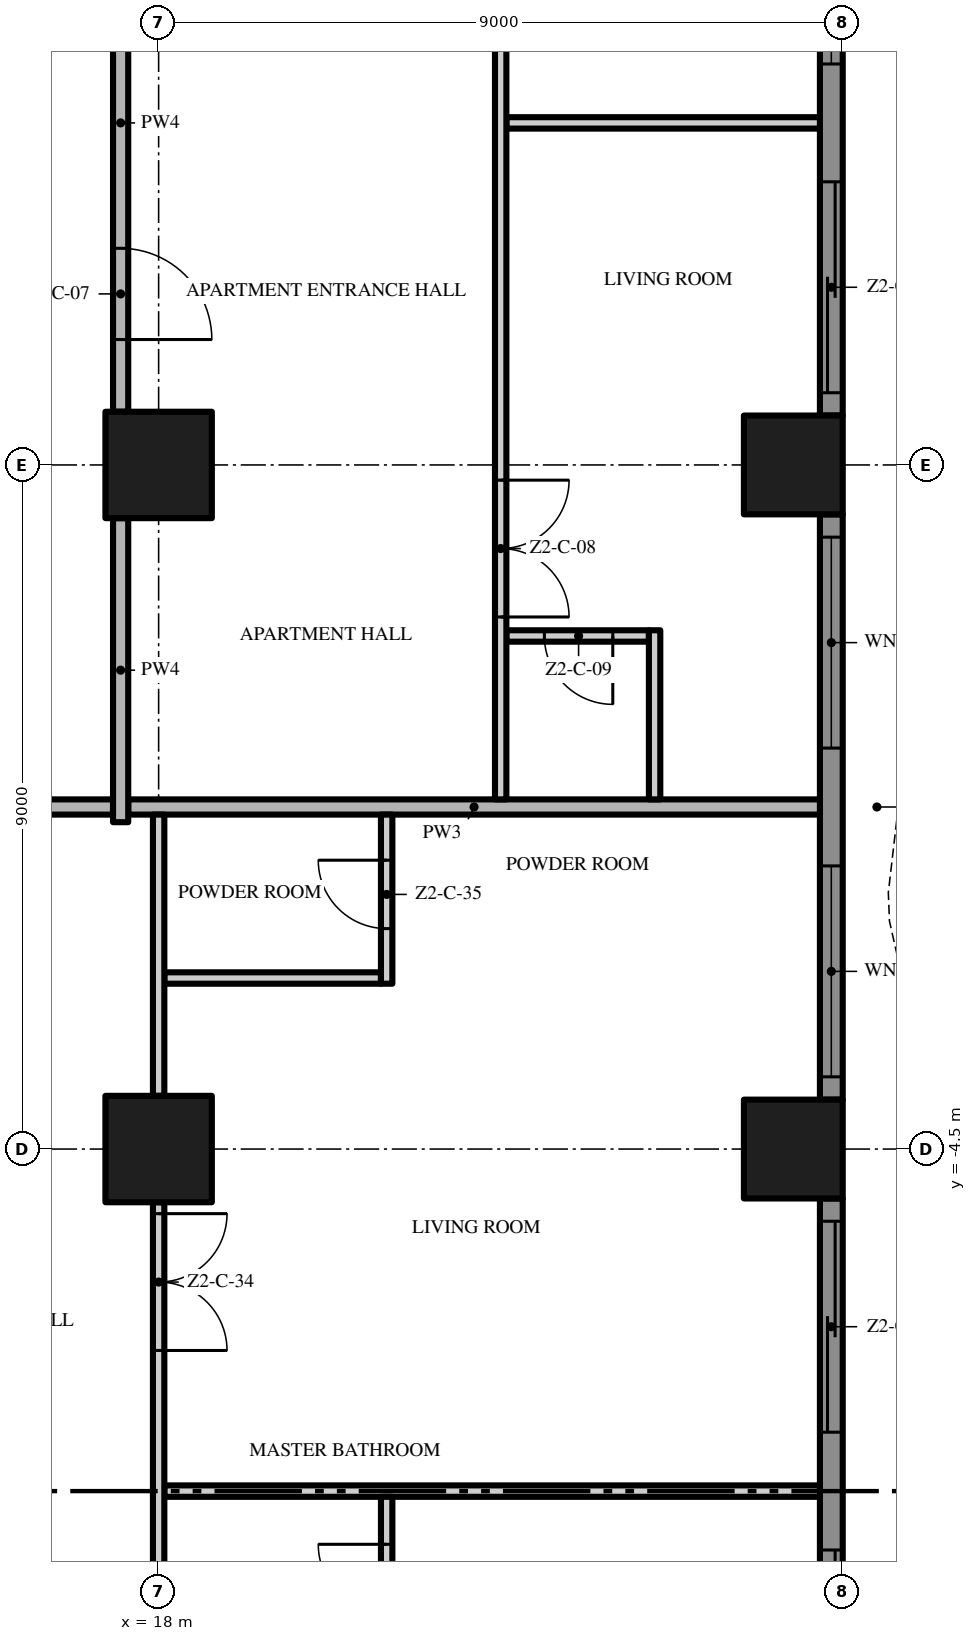
"""IFC4 building model, lengths in metres.
Left out: names, types, materials, properties, quantities, classifications, styles, units other than length and angle.
Written with IfcOpenShell. Run it as: python <this file> out.ifc"""

import sys

from ifc_helpers import new_model, si_unit, direction, frame, frame_2d, origin, origin_2d, place, context, subcontext, project, spatial, polyline, rectangle, outline, extrude, element, fill, save


model = new_model("IFC4")
c1 = context("Model", 3, precision=1e-05, world=origin(), true_north=direction((0.0, 1.0)))
c2 = subcontext(c1, "Body", "Model", "MODEL_VIEW")
j1 = project(units=[si_unit("LENGTHUNIT", "METRE"), si_unit("PLANEANGLEUNIT", "RADIAN")], contexts=[c1])
p1 = place(None, origin())
s1 = spatial("IfcSite", under=j1, at=p1, CompositionType="ELEMENT")
p2 = place(p1, origin())
s2 = spatial("IfcBuilding", under=s1, at=p2, CompositionType="ELEMENT")
p3 = place(p2, frame((0.0, 0.0, 96.0)))
s3 = spatial("IfcBuildingStorey", under=s2, at=p3, CompositionType="ELEMENT", Elevation=96.0)
for number, where, z_axis, x_axis in (
    (1, (18.0, -4.5, 0.0), (0.0, 0.0, 1.0), (1.0, 0.0, 0.0)),
    (2, (18.0, 4.5, 0.0), (0.0, 0.0, 1.0), (1.0, 0.0, 0.0)),
):
    element("IfcColumn", number, at=place(p3, frame(where, z_axis=z_axis, x_axis=x_axis)), inside=s3, PredefinedType="COLUMN", context=c2, shape_type="SweptSolid", body=[
        extrude(rectangle(XDim=1.4, YDim=1.4, at=origin_2d()), origin(), (0.0, 0.0, 1.0), 3.5),
    ])
for number, where, z_axis, x_axis in (
    (3, (26.35, -4.5, 0.0), (0.0, 0.0, 1.0), (1.0, 0.0, 0.0)),
    (4, (26.35, 4.5, 0.0), (0.0, 0.0, 1.0), (1.0, 0.0, 0.0)),
):
    element("IfcColumn", number, at=place(p3, frame(where, z_axis=z_axis, x_axis=x_axis)), inside=s3, PredefinedType="COLUMN", context=c2, shape_type="SweptSolid", body=[
        extrude(rectangle(XDim=1.3, YDim=1.3, at=origin_2d()), origin(), (0.0, 0.0, 1.0), 3.5),
    ])
p4 = place(p3, frame((26.85, -5.15, 0.0), z_axis=(0.0, 0.0, 1.0), x_axis=(0.0, -1.0, 0.0)))
e5 = element("IfcWall", 5, at=p4, inside=s3, PredefinedType="SOLIDWALL", context=c2, shape_type="SweptSolid", body=[
    extrude(rectangle(XDim=7.7, YDim=0.3, at=frame_2d((3.85, 0.0))), origin(), (0.0, 0.0, 1.0), 3.5),
])
p5 = place(p4, frame((4.625, 0.0, 0.0)))
e6 = element("IfcOpeningElement", 6, at=p5, cuts=e5, PredefinedType="OPENING", context=c2, shape_type="SweptSolid", body=[
    extrude(rectangle(XDim=2.775, YDim=2.4, at=frame_2d((1.387, 1.2))), frame((0.0, 0.16, 0.0), z_axis=(0.0, -1.0, 0.0), x_axis=(1.0, 0.0, 0.0)), (0.0, 0.0, 1.0), 0.32),
])
p6 = place(p4, frame((0.3, 0.0, 0.0)))
e7 = element("IfcOpeningElement", 7, at=p6, cuts=e5, PredefinedType="OPENING", context=c2, shape_type="SweptSolid", body=[
    extrude(rectangle(XDim=2.775, YDim=2.4, at=frame_2d((1.387, 1.2))), frame((0.0, 0.16, 0.0), z_axis=(0.0, -1.0, 0.0), x_axis=(1.0, 0.0, 0.0)), (0.0, 0.0, 1.0), 0.32),
])
p7 = place(p3, frame((26.85, 3.85, 0.0), z_axis=(0.0, 0.0, 1.0), x_axis=(0.0, -1.0, 0.0)))
e8 = element("IfcWall", 8, at=p7, inside=s3, PredefinedType="SOLIDWALL", context=c2, shape_type="SweptSolid", body=[
    extrude(rectangle(XDim=7.7, YDim=0.3, at=frame_2d((3.85, 0.0))), origin(), (0.0, 0.0, 1.0), 3.5),
])
p8 = place(p7, frame((4.625, 0.0, 0.45)))
e9 = element("IfcOpeningElement", 9, at=p8, cuts=e8, PredefinedType="OPENING", context=c2, shape_type="SweptSolid", body=[
    extrude(rectangle(XDim=2.775, YDim=2.65, at=frame_2d((1.387, 1.325))), frame((0.0, 0.16, 0.0), z_axis=(0.0, -1.0, 0.0), x_axis=(1.0, 0.0, 0.0)), (0.0, 0.0, 1.0), 0.32),
])
p9 = place(p7, frame((0.3, 0.0, 0.45)))
e10 = element("IfcOpeningElement", 10, at=p9, cuts=e8, PredefinedType="OPENING", context=c2, shape_type="SweptSolid", body=[
    extrude(rectangle(XDim=2.775, YDim=2.65, at=frame_2d((1.387, 1.325))), frame((0.0, 0.16, 0.0), z_axis=(0.0, -1.0, 0.0), x_axis=(1.0, 0.0, 0.0)), (0.0, 0.0, 1.0), 0.32),
])
p10 = place(p3, frame((26.85, 12.85, 0.0), z_axis=(0.0, 0.0, 1.0), x_axis=(0.0, -1.0, 0.0)))
e11 = element("IfcWall", 11, at=p10, inside=s3, PredefinedType="SOLIDWALL", context=c2, shape_type="SweptSolid", body=[
    extrude(rectangle(XDim=7.7, YDim=0.3, at=frame_2d((3.85, 0.0))), origin(), (0.0, 0.0, 1.0), 3.5),
])
p11 = place(p10, frame((4.625, 0.0, 0.0)))
e12 = element("IfcOpeningElement", 12, at=p11, cuts=e11, PredefinedType="OPENING", context=c2, shape_type="SweptSolid", body=[
    extrude(rectangle(XDim=2.775, YDim=2.4, at=frame_2d((1.387, 1.2))), frame((0.0, 0.16, 0.0), z_axis=(0.0, -1.0, 0.0), x_axis=(1.0, 0.0, 0.0)), (0.0, 0.0, 1.0), 0.32),
])
p12 = place(p10, frame((0.3, 0.0, 0.45)))
e13 = element("IfcOpeningElement", 13, at=p12, cuts=e11, PredefinedType="OPENING", context=c2, shape_type="SweptSolid", body=[
    extrude(rectangle(XDim=2.775, YDim=2.65, at=frame_2d((1.387, 1.325))), frame((0.0, 0.16, 0.0), z_axis=(0.0, -1.0, 0.0), x_axis=(1.0, 0.0, 0.0)), (0.0, 0.0, 1.0), 0.32),
])
p13 = place(p3, origin())
e14 = element("IfcWall", 14, at=p13, inside=s3, PredefinedType="USERDEFINED", context=c2, shape_type="SweptSolid", body=[
    extrude(outline(polyline([(27.951, -18.0), (27.615, -16.5), (27.6, -16.125), (27.731, -15.0), (28.255, -13.5), (28.988, -12.0), (29.649, -10.5), (29.985, -9.0), (30.0, -8.625), (29.869, -7.5), (29.345, -6.0), (28.612, -4.5), (27.951, -3.0), (27.615, -1.5), (27.6, -1.125), (27.731, 0.0), (28.255, 1.5), (28.988, 3.0), (29.649, 4.5), (29.985, 6.0), (30.0, 6.375), (29.869, 7.5), (29.345, 9.0), (28.612, 10.5), (27.951, 12.0), (27.615, 13.5), (27.6, 13.875), (27.731, 15.0), (28.255, 16.5), (28.988, 18.0), (28.763, 18.11), (28.024, 16.596), (27.486, 15.056), (27.349, 13.885), (27.366, 13.467), (27.713, 11.921), (28.385, 10.395), (29.114, 8.904), (29.624, 7.444), (29.749, 6.365), (29.736, 6.033), (29.41, 4.579), (28.761, 3.105), (28.024, 1.596), (27.486, 0.056), (27.349, -1.115), (27.366, -1.533), (27.713, -3.079), (28.385, -4.605), (29.114, -6.096), (29.624, -7.556), (29.749, -8.635), (29.736, -8.967), (29.41, -10.421), (28.761, -11.895), (28.024, -13.404), (27.486, -14.944), (27.349, -16.115), (27.366, -16.533), (27.708, -18.055), (27.951, -18.0)])), origin(), (0.0, 0.0, 1.0), 0.9),
])
p14 = place(p3, frame((18.075, -9.0, 0.0), z_axis=(0.0, 0.0, 1.0), x_axis=(1.0, 0.0, 0.0)))
e15 = element("IfcWall", 15, at=p14, inside=s3, PredefinedType="PARTITIONING", context=c2, shape_type="SweptSolid", body=[
    extrude(rectangle(XDim=8.625, YDim=0.15, at=frame_2d((4.312, 0.0))), origin(), (0.0, 0.0, 1.0), 3.5),
])
p15 = place(p3, frame((18.075, -2.25, 0.0), z_axis=(0.0, 0.0, 1.0), x_axis=(1.0, 0.0, 0.0)))
e16 = element("IfcWall", 16, at=p15, inside=s3, PredefinedType="PARTITIONING", context=c2, shape_type="SweptSolid", body=[
    extrude(rectangle(XDim=2.85, YDim=0.15, at=frame_2d((1.425, 0.0))), origin(), (0.0, 0.0, 1.0), 3.5),
])
p16 = place(p3, frame((4.6, 0.0, 0.0), z_axis=(0.0, 0.0, 1.0), x_axis=(1.0, 0.0, 0.0)))
e17 = element("IfcWall", 17, at=p16, inside=s3, PredefinedType="PARTITIONING", context=c2, shape_type="SweptSolid", body=[
    extrude(rectangle(XDim=12.8, YDim=0.2, at=frame_2d((6.4, 0.0))), origin(), (0.0, 0.0, 1.0), 3.5),
])
p17 = place(p3, frame((17.6, 0.0, 0.0), z_axis=(0.0, 0.0, 1.0), x_axis=(1.0, 0.0, 0.0)))
e18 = element("IfcWall", 18, at=p17, inside=s3, PredefinedType="PARTITIONING", context=c2, shape_type="SweptSolid", body=[
    extrude(rectangle(XDim=9.1, YDim=0.2, at=frame_2d((4.55, 0.0))), origin(), (0.0, 0.0, 1.0), 3.5),
])
p18 = place(p3, frame((24.45, 2.25, 0.0), z_axis=(0.0, 0.0, 1.0), x_axis=(-1.0, 0.0, 0.0)))
e19 = element("IfcWall", 19, at=p18, inside=s3, PredefinedType="PARTITIONING", context=c2, shape_type="SweptSolid", body=[
    extrude(rectangle(XDim=1.875, YDim=0.15, at=frame_2d((0.938, 0.0))), origin(), (0.0, 0.0, 1.0), 3.5),
])
p19 = place(p18, frame((0.475, 0.0, 0.0)))
e20 = element("IfcOpeningElement", 20, at=p19, cuts=e19, PredefinedType="OPENING", context=c2, shape_type="SweptSolid", body=[
    extrude(rectangle(XDim=0.9, YDim=2.1, at=frame_2d((0.45, 1.05))), frame((0.0, 0.085, 0.0), z_axis=(0.0, -1.0, 0.0), x_axis=(1.0, 0.0, 0.0)), (0.0, 0.0, 1.0), 0.17),
])
p20 = place(p3, frame((22.575, 9.0, 0.0), z_axis=(0.0, 0.0, 1.0), x_axis=(1.0, 0.0, 0.0)))
e21 = element("IfcWall", 21, at=p20, inside=s3, PredefinedType="PARTITIONING", context=c2, shape_type="SweptSolid", body=[
    extrude(rectangle(XDim=4.125, YDim=0.15, at=frame_2d((2.062, 0.0))), origin(), (0.0, 0.0, 1.0), 3.5),
])
p21 = place(p3, frame((17.5, -0.2, 0.0), z_axis=(0.0, 0.0, 1.0), x_axis=(0.0, 1.0, 0.0)))
e22 = element("IfcWall", 22, at=p21, inside=s3, PredefinedType="PARTITIONING", context=c2, shape_type="SweptSolid", body=[
    extrude(rectangle(XDim=4.0, YDim=0.2, at=frame_2d((2.0, 0.0))), origin(), (0.0, 0.0, 1.0), 3.5),
])
p22 = place(p3, frame((17.5, 12.8, 0.0), z_axis=(0.0, 0.0, 1.0), x_axis=(0.0, -1.0, 0.0)))
e23 = element("IfcWall", 23, at=p22, inside=s3, PredefinedType="PARTITIONING", context=c2, shape_type="SweptSolid", body=[
    extrude(rectangle(XDim=7.6, YDim=0.2, at=frame_2d((3.8, 0.0))), origin(), (0.0, 0.0, 1.0), 3.5),
])
p23 = place(p22, frame((5.45, 0.0, 0.0)))
e24 = element("IfcOpeningElement", 24, at=p23, cuts=e23, PredefinedType="OPENING", context=c2, shape_type="SweptSolid", body=[
    extrude(rectangle(XDim=1.2, YDim=2.4, at=frame_2d((0.6, 1.2))), frame((0.0, 0.11, 0.0), z_axis=(0.0, -1.0, 0.0), x_axis=(1.0, 0.0, 0.0)), (0.0, 0.0, 1.0), 0.22),
])
p24 = place(p3, frame((18.0, -5.2, 0.0), z_axis=(0.0, 0.0, 1.0), x_axis=(0.0, -1.0, 0.0)))
e25 = element("IfcWall", 25, at=p24, inside=s3, PredefinedType="PARTITIONING", context=c2, shape_type="SweptSolid", body=[
    extrude(rectangle(XDim=7.6, YDim=0.15, at=frame_2d((3.8, 0.0))), origin(), (0.0, 0.0, 1.0), 3.5),
])
p25 = place(p24, frame((0.15, 0.0, 0.0)))
e26 = element("IfcOpeningElement", 26, at=p25, cuts=e25, PredefinedType="OPENING", context=c2, shape_type="SweptSolid", body=[
    extrude(rectangle(XDim=1.8, YDim=2.4, at=frame_2d((0.9, 1.2))), frame((0.0, 0.085, 0.0), z_axis=(0.0, -1.0, 0.0), x_axis=(1.0, 0.0, 0.0)), (0.0, 0.0, 1.0), 0.17),
])
p26 = place(p24, frame((6.45, 0.0, 0.0)))
e27 = element("IfcOpeningElement", 27, at=p26, cuts=e25, PredefinedType="OPENING", context=c2, shape_type="SweptSolid", body=[
    extrude(rectangle(XDim=1.0, YDim=2.4, at=frame_2d((0.5, 1.2))), frame((0.0, 0.085, 0.0), z_axis=(0.0, -1.0, 0.0), x_axis=(1.0, 0.0, 0.0)), (0.0, 0.0, 1.0), 0.17),
])
p27 = place(p3, frame((18.0, -3.8, 0.0), z_axis=(0.0, 0.0, 1.0), x_axis=(0.0, 1.0, 0.0)))
e28 = element("IfcWall", 28, at=p27, inside=s3, PredefinedType="PARTITIONING", context=c2, shape_type="SweptSolid", body=[
    extrude(rectangle(XDim=3.7, YDim=0.15, at=frame_2d((1.85, 0.0))), origin(), (0.0, 0.0, 1.0), 3.5),
])
p28 = place(p3, frame((21.0, -11.325, 0.0), z_axis=(0.0, 0.0, 1.0), x_axis=(0.0, 1.0, 0.0)))
e29 = element("IfcWall", 29, at=p28, inside=s3, PredefinedType="PARTITIONING", context=c2, shape_type="SweptSolid", body=[
    extrude(rectangle(XDim=2.25, YDim=0.15, at=frame_2d((1.125, 0.0))), origin(), (0.0, 0.0, 1.0), 3.5),
])
p29 = place(p28, frame((0.725, 0.0, 0.0)))
e30 = element("IfcOpeningElement", 30, at=p29, cuts=e29, PredefinedType="OPENING", context=c2, shape_type="SweptSolid", body=[
    extrude(rectangle(XDim=0.9, YDim=2.1, at=frame_2d((0.45, 1.05))), frame((0.0, 0.085, 0.0), z_axis=(0.0, -1.0, 0.0), x_axis=(1.0, 0.0, 0.0)), (0.0, 0.0, 1.0), 0.17),
])
p30 = place(p3, frame((21.0, -2.325, 0.0), z_axis=(0.0, 0.0, 1.0), x_axis=(0.0, 1.0, 0.0)))
e31 = element("IfcWall", 31, at=p30, inside=s3, PredefinedType="PARTITIONING", context=c2, shape_type="SweptSolid", body=[
    extrude(rectangle(XDim=2.225, YDim=0.15, at=frame_2d((1.113, 0.0))), origin(), (0.0, 0.0, 1.0), 3.5),
])
p31 = place(p30, frame((0.725, 0.0, 0.0)))
e32 = element("IfcOpeningElement", 32, at=p31, cuts=e31, PredefinedType="OPENING", context=c2, shape_type="SweptSolid", body=[
    extrude(rectangle(XDim=0.9, YDim=2.1, at=frame_2d((0.45, 1.05))), frame((0.0, 0.085, 0.0), z_axis=(0.0, -1.0, 0.0), x_axis=(1.0, 0.0, 0.0)), (0.0, 0.0, 1.0), 0.17),
])
p32 = place(p3, frame((22.5, 17.35, 0.0), z_axis=(0.0, 0.0, 1.0), x_axis=(0.0, -1.0, 0.0)))
e33 = element("IfcWall", 33, at=p32, inside=s3, PredefinedType="PARTITIONING", context=c2, shape_type="SweptSolid", body=[
    extrude(rectangle(XDim=17.25, YDim=0.15, at=frame_2d((8.625, 0.0))), origin(), (0.0, 0.0, 1.0), 3.5),
])
p33 = place(p32, frame((13.05, 0.0, 0.0)))
e34 = element("IfcOpeningElement", 34, at=p33, cuts=e33, PredefinedType="OPENING", context=c2, shape_type="SweptSolid", body=[
    extrude(rectangle(XDim=1.8, YDim=2.4, at=frame_2d((0.9, 1.2))), frame((0.0, 0.085, 0.0), z_axis=(0.0, -1.0, 0.0), x_axis=(1.0, 0.0, 0.0)), (0.0, 0.0, 1.0), 0.17),
])
p34 = place(p32, frame((5.6, 0.0, 0.0)))
e35 = element("IfcOpeningElement", 35, at=p34, cuts=e33, PredefinedType="OPENING", context=c2, shape_type="SweptSolid", body=[
    extrude(rectangle(XDim=1.0, YDim=2.4, at=frame_2d((0.5, 1.2))), frame((0.0, 0.085, 0.0), z_axis=(0.0, -1.0, 0.0), x_axis=(1.0, 0.0, 0.0)), (0.0, 0.0, 1.0), 0.17),
])
p35 = place(p3, frame((24.525, 0.1, 0.0), z_axis=(0.0, 0.0, 1.0), x_axis=(0.0, 1.0, 0.0)))
e36 = element("IfcWall", 36, at=p35, inside=s3, PredefinedType="PARTITIONING", context=c2, shape_type="SweptSolid", body=[
    extrude(rectangle(XDim=2.225, YDim=0.15, at=frame_2d((1.113, 0.0))), origin(), (0.0, 0.0, 1.0), 3.5),
])
p36 = place(p5, origin())
e37 = element("IfcDoor", 37, at=p36, inside=s3, OperationType="SINGLE_SWING_LEFT", PredefinedType="DOOR", context=c2, shape_type="SweptSolid", body=[
    extrude(rectangle(XDim=2.775, YDim=2.4, at=frame_2d((1.387, 1.2))), frame((0.0, 0.025, 0.0), z_axis=(0.0, -1.0, 0.0), x_axis=(1.0, 0.0, 0.0)), (0.0, 0.0, 1.0), 0.05),
])
fill(e6, e37)
p37 = place(p6, origin())
e38 = element("IfcDoor", 38, at=p37, inside=s3, OperationType="SINGLE_SWING_LEFT", PredefinedType="DOOR", context=c2, shape_type="SweptSolid", body=[
    extrude(rectangle(XDim=2.775, YDim=2.4, at=frame_2d((1.387, 1.2))), frame((0.0, 0.025, 0.0), z_axis=(0.0, -1.0, 0.0), x_axis=(1.0, 0.0, 0.0)), (0.0, 0.0, 1.0), 0.05),
])
fill(e7, e38)
p38 = place(p8, origin())
e39 = element("IfcWindow", 39, at=p38, inside=s3, PartitioningType="SINGLE_PANEL", PredefinedType="WINDOW", context=c2, shape_type="SweptSolid", body=[
    extrude(rectangle(XDim=2.775, YDim=2.65, at=frame_2d((1.387, 1.325))), frame((0.0, 0.03, 0.0), z_axis=(0.0, -1.0, 0.0), x_axis=(1.0, 0.0, 0.0)), (0.0, 0.0, 1.0), 0.06),
])
fill(e9, e39)
p39 = place(p9, origin())
e40 = element("IfcWindow", 40, at=p39, inside=s3, PartitioningType="SINGLE_PANEL", PredefinedType="WINDOW", context=c2, shape_type="SweptSolid", body=[
    extrude(rectangle(XDim=2.775, YDim=2.65, at=frame_2d((1.387, 1.325))), frame((0.0, 0.03, 0.0), z_axis=(0.0, -1.0, 0.0), x_axis=(1.0, 0.0, 0.0)), (0.0, 0.0, 1.0), 0.06),
])
fill(e10, e40)
p40 = place(p11, origin())
e41 = element("IfcDoor", 41, at=p40, inside=s3, OperationType="SINGLE_SWING_LEFT", PredefinedType="DOOR", context=c2, shape_type="SweptSolid", body=[
    extrude(rectangle(XDim=2.775, YDim=2.4, at=frame_2d((1.387, 1.2))), frame((0.0, 0.025, 0.0), z_axis=(0.0, -1.0, 0.0), x_axis=(1.0, 0.0, 0.0)), (0.0, 0.0, 1.0), 0.05),
])
fill(e12, e41)
p41 = place(p12, origin())
e42 = element("IfcWindow", 42, at=p41, inside=s3, PartitioningType="SINGLE_PANEL", PredefinedType="WINDOW", context=c2, shape_type="SweptSolid", body=[
    extrude(rectangle(XDim=2.775, YDim=2.65, at=frame_2d((1.387, 1.325))), frame((0.0, 0.03, 0.0), z_axis=(0.0, -1.0, 0.0), x_axis=(1.0, 0.0, 0.0)), (0.0, 0.0, 1.0), 0.06),
])
fill(e13, e42)
p42 = place(p23, origin())
e43 = element("IfcDoor", 43, at=p42, inside=s3, OperationType="SINGLE_SWING_RIGHT", PredefinedType="DOOR", context=c2, shape_type="SweptSolid", body=[
    extrude(rectangle(XDim=1.2, YDim=2.4, at=frame_2d((0.6, 1.2))), frame((0.0, 0.025, 0.0), z_axis=(0.0, -1.0, 0.0), x_axis=(1.0, 0.0, 0.0)), (0.0, 0.0, 1.0), 0.05),
])
fill(e24, e43)
p43 = place(p33, origin())
e44 = element("IfcDoor", 44, at=p43, inside=s3, OperationType="DOUBLE_DOOR_SINGLE_SWING", PredefinedType="DOOR", context=c2, shape_type="SweptSolid", body=[
    extrude(rectangle(XDim=1.8, YDim=2.4, at=frame_2d((0.9, 1.2))), frame((0.0, 0.025, 0.0), z_axis=(0.0, -1.0, 0.0), x_axis=(1.0, 0.0, 0.0)), (0.0, 0.0, 1.0), 0.05),
])
fill(e34, e44)
p44 = place(p19, origin())
e45 = element("IfcDoor", 45, at=p44, inside=s3, OperationType="SINGLE_SWING_LEFT", PredefinedType="DOOR", context=c2, shape_type="SweptSolid", body=[
    extrude(rectangle(XDim=0.9, YDim=2.1, at=frame_2d((0.45, 1.05))), frame((0.0, 0.025, 0.0), z_axis=(0.0, -1.0, 0.0), x_axis=(1.0, 0.0, 0.0)), (0.0, 0.0, 1.0), 0.05),
])
fill(e20, e45)
p45 = place(p25, origin())
e46 = element("IfcDoor", 46, at=p45, inside=s3, OperationType="DOUBLE_DOOR_SINGLE_SWING", PredefinedType="DOOR", context=c2, shape_type="SweptSolid", body=[
    extrude(rectangle(XDim=1.8, YDim=2.4, at=frame_2d((0.9, 1.2))), frame((0.0, 0.025, 0.0), z_axis=(0.0, -1.0, 0.0), x_axis=(1.0, 0.0, 0.0)), (0.0, 0.0, 1.0), 0.05),
])
fill(e26, e46)
p46 = place(p31, origin())
e47 = element("IfcDoor", 47, at=p46, inside=s3, OperationType="SINGLE_SWING_RIGHT", PredefinedType="DOOR", context=c2, shape_type="SweptSolid", body=[
    extrude(rectangle(XDim=0.9, YDim=2.1, at=frame_2d((0.45, 1.05))), frame((0.0, 0.025, 0.0), z_axis=(0.0, -1.0, 0.0), x_axis=(1.0, 0.0, 0.0)), (0.0, 0.0, 1.0), 0.05),
])
fill(e32, e47)
p47 = place(p29, origin())
e48 = element("IfcDoor", 48, at=p47, inside=s3, OperationType="SINGLE_SWING_RIGHT", PredefinedType="DOOR", context=c2, shape_type="SweptSolid", body=[
    extrude(rectangle(XDim=0.9, YDim=2.1, at=frame_2d((0.45, 1.05))), frame((0.0, 0.025, 0.0), z_axis=(0.0, -1.0, 0.0), x_axis=(1.0, 0.0, 0.0)), (0.0, 0.0, 1.0), 0.05),
])
fill(e30, e48)
save(model, sys.argv[1])
